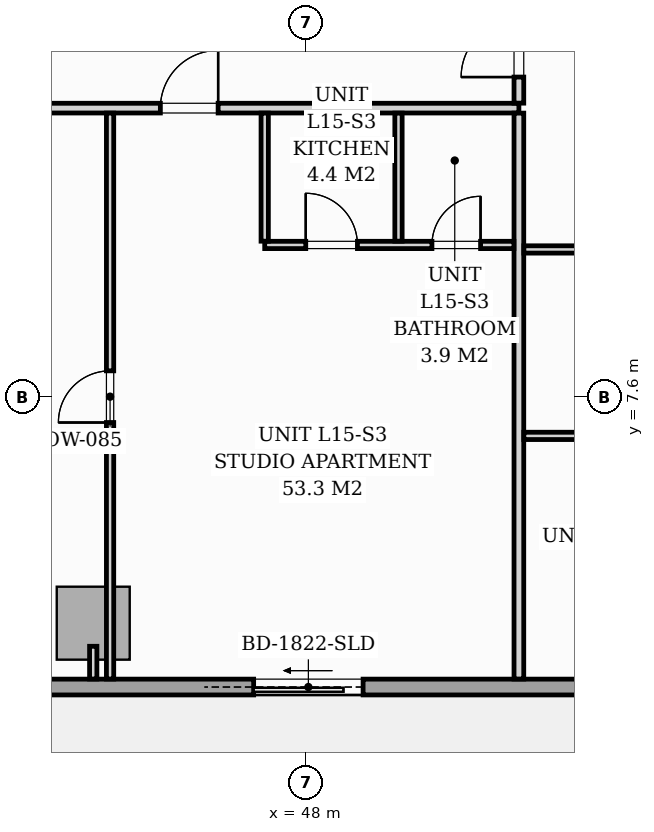
"""IFC4 building model, lengths in metres.
Left out: names, types, materials, properties, quantities, classifications, styles, units other than length and angle.
Written with IfcOpenShell. Run it as: python <this file> out.ifc"""

import sys

from ifc_helpers import new_model, si_unit, direction, frame, frame_2d, origin, origin_2d, place, context, subcontext, project, spatial, rectangle, extrude, source, transform, mapped, element, fill, save


model = new_model("IFC4")
c1 = context("Model", 3, precision=1e-05, world=origin(), true_north=direction((0.0, 1.0)))
c2 = subcontext(c1, "Body", "Model", "MODEL_VIEW")
j1 = project(units=[si_unit("LENGTHUNIT", "METRE"), si_unit("PLANEANGLEUNIT", "RADIAN")], contexts=[c1])
p1 = place(None, origin())
s1 = spatial("IfcSite", under=j1, at=p1, CompositionType="ELEMENT")
p2 = place(p1, origin())
s2 = spatial("IfcBuilding", under=s1, at=p2, CompositionType="ELEMENT")
p3 = place(p2, frame((0.0, 0.0, 55.0)))
s3 = spatial("IfcBuildingStorey", under=s2, at=p3, CompositionType="ELEMENT", Elevation=55.0)
m1 = source(origin(), c2, "Body", "SweptSolid", [
    extrude(rectangle(XDim=1.2, YDim=1.2, at=origin_2d()), origin(), (0.0, 0.0, 1.0), 3.196),
])
p4 = place(p3, frame((44.5, 3.88, 0.002), z_axis=(0.0, 0.0, 1.0), x_axis=(1.0, 0.0, 0.0)))
e1 = element("IfcColumn", 1, at=p4, inside=s3, PredefinedType="COLUMN", context=c2, shape_type="MappedRepresentation", body=[
    mapped(m1, transform((0.0, 0.0, 0.0), scale=1.0)),
])
p5 = place(p3, frame((57.3, 2.83, 0.0), z_axis=(0.0, 0.0, 1.0), x_axis=(-1.0, 0.0, 0.0)))
e2 = element("IfcWall", 2, at=p5, inside=s3, PredefinedType="STANDARD", context=c2, shape_type="SweptSolid", body=[
    extrude(rectangle(XDim=17.15, YDim=0.26, at=frame_2d((8.575, 0.0))), origin(), (0.0, 0.0, 1.0), 2.94),
])
p6 = place(p5, frame((8.362, 0.0, 0.0)))
e3 = element("IfcOpeningElement", 3, at=p6, cuts=e2, PredefinedType="OPENING", context=c2, shape_type="SweptSolid", body=[
    extrude(rectangle(XDim=1.8, YDim=2.06, at=frame_2d((0.9, 1.03))), frame((0.0, 0.14, 0.0), z_axis=(0.0, -1.0, 0.0), x_axis=(1.0, 0.0, 0.0)), (0.0, 0.0, 1.0), 0.28),
])
p7 = place(p5, frame((2.05, 0.0, 0.65)))
e4 = element("IfcOpeningElement", 4, at=p7, cuts=e2, PredefinedType="OPENING", context=c2, shape_type="SweptSolid", body=[
    extrude(rectangle(XDim=1.6, YDim=1.5, at=frame_2d((0.8, 0.75))), frame((0.0, 0.14, 0.0), z_axis=(0.0, -1.0, 0.0), x_axis=(1.0, 0.0, 0.0)), (0.0, 0.0, 1.0), 0.28),
])
p8 = place(p3, frame((16.3, 12.35, 0.0), z_axis=(0.0, 0.0, 1.0), x_axis=(1.0, 0.0, 0.0)))
e5 = element("IfcWall", 5, at=p8, inside=s3, PredefinedType="PARTITIONING", context=c2, shape_type="SweptSolid", body=[
    extrude(rectangle(XDim=35.2, YDim=0.16, at=frame_2d((17.6, 0.0))), origin(), (0.0, 0.0, 1.0), 2.94),
])
p9 = place(p8, frame((6.307, 0.0, 0.0)))
e6 = element("IfcOpeningElement", 6, at=p9, cuts=e5, PredefinedType="OPENING", context=c2, shape_type="SweptSolid", body=[
    extrude(rectangle(XDim=0.95, YDim=2.06, at=frame_2d((0.475, 1.03))), frame((0.0, 0.09, 0.0), z_axis=(0.0, -1.0, 0.0), x_axis=(1.0, 0.0, 0.0)), (0.0, 0.0, 1.0), 0.18),
])
p10 = place(p8, frame((18.392, 0.0, 0.0)))
e7 = element("IfcOpeningElement", 7, at=p10, cuts=e5, PredefinedType="OPENING", context=c2, shape_type="SweptSolid", body=[
    extrude(rectangle(XDim=0.95, YDim=2.06, at=frame_2d((0.475, 1.03))), frame((0.0, 0.09, 0.0), z_axis=(0.0, -1.0, 0.0), x_axis=(1.0, 0.0, 0.0)), (0.0, 0.0, 1.0), 0.18),
])
p11 = place(p8, frame((29.304, 0.0, 0.0)))
e8 = element("IfcOpeningElement", 8, at=p11, cuts=e5, PredefinedType="OPENING", context=c2, shape_type="SweptSolid", body=[
    extrude(rectangle(XDim=0.95, YDim=2.06, at=frame_2d((0.475, 1.03))), frame((0.0, 0.09, 0.0), z_axis=(0.0, -1.0, 0.0), x_axis=(1.0, 0.0, 0.0)), (0.0, 0.0, 1.0), 0.18),
])
p12 = place(p3, frame((51.5, 2.962, 0.0), z_axis=(0.0, 0.0, 1.0), x_axis=(0.0, 1.0, 0.0)))
e9 = element("IfcWall", 9, at=p12, inside=s3, PredefinedType="PARTITIONING", context=c2, shape_type="SweptSolid", body=[
    extrude(rectangle(XDim=9.306, YDim=0.16, at=frame_2d((4.653, 0.0))), origin(), (0.0, 0.0, 1.0), 2.94),
])
p13 = place(p3, frame((51.5, 12.432, 0.0), z_axis=(0.0, 0.0, 1.0), x_axis=(0.0, 1.0, 0.0)))
e10 = element("IfcWall", 10, at=p13, inside=s3, PredefinedType="PARTITIONING", context=c2, shape_type="SweptSolid", body=[
    extrude(rectangle(XDim=15.006, YDim=0.16, at=frame_2d((7.503, 0.0))), origin(), (0.0, 0.0, 1.0), 2.94),
])
p14 = place(p13, frame((0.429, 0.0, 0.0)))
e11 = element("IfcOpeningElement", 11, at=p14, cuts=e10, PredefinedType="OPENING", context=c2, shape_type="SweptSolid", body=[
    extrude(rectangle(XDim=0.95, YDim=2.06, at=frame_2d((0.475, 1.03))), frame((0.0, 0.09, 0.0), z_axis=(0.0, -1.0, 0.0), x_axis=(1.0, 0.0, 0.0)), (0.0, 0.0, 1.0), 0.18),
])
p15 = place(p3, frame((47.32, 10.1, 0.0), z_axis=(0.0, 0.0, 1.0), x_axis=(1.0, 0.0, 0.0)))
e12 = element("IfcWall", 12, at=p15, inside=s3, PredefinedType="PARTITIONING", context=c2, shape_type="SweptSolid", body=[
    extrude(rectangle(XDim=4.098, YDim=0.12, at=frame_2d((2.049, 0.0))), origin(), (0.0, 0.0, 1.0), 2.94),
])
p16 = place(p15, frame((0.675, 0.0, 0.0)))
e13 = element("IfcOpeningElement", 13, at=p16, cuts=e12, PredefinedType="OPENING", context=c2, shape_type="SweptSolid", body=[
    extrude(rectangle(XDim=0.85, YDim=2.05, at=frame_2d((0.425, 1.025))), frame((0.0, 0.07, 0.0), z_axis=(0.0, -1.0, 0.0), x_axis=(1.0, 0.0, 0.0)), (0.0, 0.0, 1.0), 0.14),
])
p17 = place(p15, frame((2.75, 0.0, 0.0)))
e14 = element("IfcOpeningElement", 14, at=p17, cuts=e12, PredefinedType="OPENING", context=c2, shape_type="SweptSolid", body=[
    extrude(rectangle(XDim=0.8, YDim=2.02, at=frame_2d((0.4, 1.01))), frame((0.0, 0.07, 0.0), z_axis=(0.0, -1.0, 0.0), x_axis=(1.0, 0.0, 0.0)), (0.0, 0.0, 1.0), 0.14),
])
for number, where, z_axis, x_axis in (
    (15, (47.32, 10.162, 0.0), (0.0, 0.0, 1.0), (0.0, 1.0, 0.0)),
    (16, (49.52, 10.162, 0.0), (0.0, 0.0, 1.0), (0.0, 1.0, 0.0)),
):
    element("IfcWall", number, at=place(p3, frame(where, z_axis=z_axis, x_axis=x_axis)), inside=s3, PredefinedType="PARTITIONING", context=c2, shape_type="SweptSolid", body=[
        extrude(rectangle(XDim=2.106, YDim=0.12, at=frame_2d((1.053, 0.0))), origin(), (0.0, 0.0, 1.0), 2.94),
    ])
p18 = place(p3, frame((44.777, 2.962, 0.0), z_axis=(0.0, 0.0, 1.0), x_axis=(0.0, 1.0, 0.0)))
e17 = element("IfcWall", 17, at=p18, inside=s3, PredefinedType="PARTITIONING", context=c2, shape_type="SweptSolid", body=[
    extrude(rectangle(XDim=9.306, YDim=0.12, at=frame_2d((4.653, 0.0))), origin(), (0.0, 0.0, 1.0), 2.136),
])
p19 = place(p18, frame((4.218, 0.0, 0.0)))
e18 = element("IfcOpeningElement", 18, at=p19, cuts=e17, PredefinedType="OPENING", context=c2, shape_type="SweptSolid", body=[
    extrude(rectangle(XDim=0.85, YDim=2.01, at=frame_2d((0.425, 1.005))), frame((0.0, 0.07, 0.0), z_axis=(0.0, -1.0, 0.0), x_axis=(1.0, 0.0, 0.0)), (0.0, 0.0, 1.0), 0.14),
])
p20 = place(p3, frame((51.582, 6.96, 0.0), z_axis=(0.0, 0.0, 1.0), x_axis=(1.0, 0.0, 0.0)))
e19 = element("IfcWall", 19, at=p20, inside=s3, PredefinedType="PARTITIONING", context=c2, shape_type="SweptSolid", body=[
    extrude(rectangle(XDim=8.138, YDim=0.12, at=frame_2d((4.069, 0.0))), origin(), (0.0, 0.0, 1.0), 2.94),
])
p21 = place(p20, frame((3.653, 0.0, 0.0)))
e20 = element("IfcOpeningElement", 20, at=p21, cuts=e19, PredefinedType="OPENING", context=c2, shape_type="SweptSolid", body=[
    extrude(rectangle(XDim=0.85, YDim=2.05, at=frame_2d((0.425, 1.025))), frame((0.0, 0.07, 0.0), z_axis=(0.0, -1.0, 0.0), x_axis=(1.0, 0.0, 0.0)), (0.0, 0.0, 1.0), 0.14),
])
p22 = place(p3, frame((51.582, 10.026, 0.0), z_axis=(0.0, 0.0, 1.0), x_axis=(1.0, 0.0, 0.0)))
e21 = element("IfcWall", 21, at=p22, inside=s3, PredefinedType="PARTITIONING", context=c2, shape_type="SweptSolid", body=[
    extrude(rectangle(XDim=8.138, YDim=0.12, at=frame_2d((4.069, 0.0))), origin(), (0.0, 0.0, 1.0), 2.94),
])
p23 = place(p22, frame((3.653, 0.0, 0.0)))
e22 = element("IfcOpeningElement", 22, at=p23, cuts=e21, PredefinedType="OPENING", context=c2, shape_type="SweptSolid", body=[
    extrude(rectangle(XDim=0.85, YDim=2.05, at=frame_2d((0.425, 1.025))), frame((0.0, 0.07, 0.0), z_axis=(0.0, -1.0, 0.0), x_axis=(1.0, 0.0, 0.0)), (0.0, 0.0, 1.0), 0.14),
])
p24 = place(p3, frame((44.5, 3.5, 0.0), z_axis=(0.0, 0.0, 1.0), x_axis=(0.0, -1.0, 0.0)))
e23 = element("IfcWall", 23, at=p24, inside=s3, PredefinedType="PARTITIONING", context=c2, shape_type="SweptSolid", body=[
    extrude(rectangle(XDim=0.538, YDim=0.12, at=frame_2d((0.269, 0.0))), origin(), (0.0, 0.0, 1.0), 2.94),
])
m2 = source(origin(), c2, "Body", "SweptSolid", [
    extrude(rectangle(XDim=1.8, YDim=2.06, at=frame_2d((0.9, 1.03))), frame((0.0, 0.025, 0.0), z_axis=(0.0, -1.0, 0.0), x_axis=(1.0, 0.0, 0.0)), (0.0, 0.0, 1.0), 0.05),
])
p25 = place(p6, origin())
e24 = element("IfcDoor", 24, at=p25, inside=s3, OperationType="SLIDING_TO_RIGHT", PredefinedType="DOOR", context=c2, shape_type="MappedRepresentation", body=[
    mapped(m2, transform((0.0, 0.0, 0.0), scale=1.0)),
])
fill(e3, e24)
m3 = source(origin(), c2, "Body", "SweptSolid", [
    extrude(rectangle(XDim=0.85, YDim=2.01, at=frame_2d((0.425, 1.005))), frame((0.0, 0.025, 0.0), z_axis=(0.0, -1.0, 0.0), x_axis=(1.0, 0.0, 0.0)), (0.0, 0.0, 1.0), 0.05),
])
p26 = place(p19, origin())
e25 = element("IfcDoor", 25, at=p26, inside=s3, OperationType="SINGLE_SWING_LEFT", PredefinedType="DOOR", context=c2, shape_type="MappedRepresentation", body=[
    mapped(m3, transform((0.0, 0.0, 0.0), scale=1.0)),
])
fill(e18, e25)
m4 = source(origin(), c2, "Body", "SweptSolid", [
    extrude(rectangle(XDim=0.95, YDim=2.06, at=frame_2d((0.475, 1.03))), frame((0.0, 0.025, 0.0), z_axis=(0.0, -1.0, 0.0), x_axis=(1.0, 0.0, 0.0)), (0.0, 0.0, 1.0), 0.05),
])
p27 = place(p11, origin())
e26 = element("IfcDoor", 26, at=p27, inside=s3, OperationType="SINGLE_SWING_RIGHT", PredefinedType="DOOR", context=c2, shape_type="MappedRepresentation", body=[
    mapped(m4, transform((0.0, 0.0, 0.0), scale=1.0)),
])
fill(e8, e26)
m5 = source(origin(), c2, "Body", "SweptSolid", [
    extrude(rectangle(XDim=0.85, YDim=2.05, at=frame_2d((0.425, 1.025))), frame((0.0, 0.025, 0.0), z_axis=(0.0, -1.0, 0.0), x_axis=(1.0, 0.0, 0.0)), (0.0, 0.0, 1.0), 0.05),
])
p28 = place(p16, origin())
e27 = element("IfcDoor", 27, at=p28, inside=s3, OperationType="SINGLE_SWING_LEFT", PredefinedType="DOOR", context=c2, shape_type="MappedRepresentation", body=[
    mapped(m5, transform((0.0, 0.0, 0.0), scale=1.0)),
])
fill(e13, e27)
m6 = source(origin(), c2, "Body", "SweptSolid", [
    extrude(rectangle(XDim=0.8, YDim=2.02, at=frame_2d((0.4, 1.01))), frame((0.0, 0.025, 0.0), z_axis=(0.0, -1.0, 0.0), x_axis=(1.0, 0.0, 0.0)), (0.0, 0.0, 1.0), 0.05),
])
p29 = place(p17, origin())
e28 = element("IfcDoor", 28, at=p29, inside=s3, OperationType="SINGLE_SWING_RIGHT", PredefinedType="DOOR", context=c2, shape_type="MappedRepresentation", body=[
    mapped(m6, transform((0.0, 0.0, 0.0), scale=1.0)),
])
fill(e14, e28)
p30 = place(p14, origin())
e29 = element("IfcDoor", 29, at=p30, inside=s3, OperationType="SINGLE_SWING_LEFT", PredefinedType="DOOR", context=c2, shape_type="MappedRepresentation", body=[
    mapped(m4, transform((0.0, 0.0, 0.0), scale=1.0)),
])
fill(e11, e29)
save(model, sys.argv[1])
